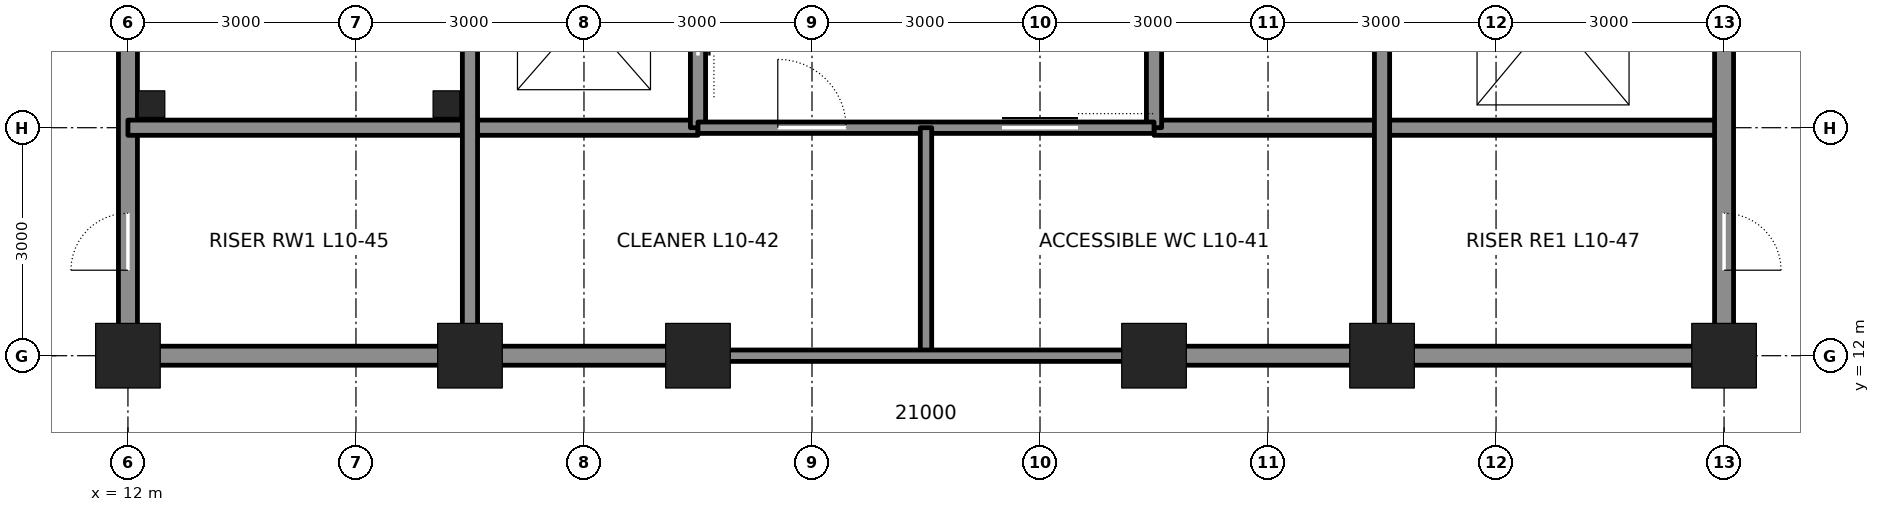
"""IFC4 building model, lengths in metres.
Left out: names, types, materials, properties, quantities, classifications, styles, units other than length and angle.
Written with IfcOpenShell. Run it as: python <this file> out.ifc"""

import sys

from ifc_helpers import new_model, si_unit, direction, frame, frame_2d, origin, origin_2d, place, context, subcontext, project, spatial, rectangle, hollow_rectangle, extrude, element, fill, save


model = new_model("IFC4")
c1 = context("Model", 3, precision=1e-05, world=origin(), true_north=direction((0.0, 1.0)))
c2 = subcontext(c1, "Body", "Model", "MODEL_VIEW")
j1 = project(units=[si_unit("LENGTHUNIT", "METRE"), si_unit("PLANEANGLEUNIT", "RADIAN")], contexts=[c1])
p1 = place(None, origin())
s1 = spatial("IfcSite", under=j1, at=p1, CompositionType="ELEMENT")
p2 = place(p1, origin())
s2 = spatial("IfcBuilding", under=s1, at=p2, CompositionType="ELEMENT")
p3 = place(p2, frame((0.0, 0.0, 51.3)))
s3 = spatial("IfcBuildingStorey", under=s2, at=p3, CompositionType="ELEMENT", Elevation=51.3)
for number, where, z_axis, x_axis in (
    (1, (12.0, 12.0, 0.0), (0.0, 0.0, 1.0), (1.0, 0.0, 0.0)),
    (2, (16.5, 12.0, 0.0), (0.0, 0.0, 1.0), (1.0, 0.0, 0.0)),
    (3, (19.5, 12.0, 0.0), (0.0, 0.0, 1.0), (1.0, 0.0, 0.0)),
    (4, (25.5, 12.0, 0.0), (0.0, 0.0, 1.0), (1.0, 0.0, 0.0)),
    (5, (28.5, 12.0, 0.0), (0.0, 0.0, 1.0), (1.0, 0.0, 0.0)),
    (6, (33.0, 12.0, 0.0), (0.0, 0.0, 1.0), (1.0, 0.0, 0.0)),
):
    element("IfcColumn", number, at=place(p3, frame(where, z_axis=z_axis, x_axis=x_axis)), inside=s3, PredefinedType="COLUMN", context=c2, shape_type="SweptSolid", body=[
        extrude(hollow_rectangle(XDim=0.85, YDim=0.85, WallThickness=0.085, at=origin_2d()), origin(), (0.0, 0.0, 1.0), 4.5),
    ])
p4 = place(p3, frame((12.0, 12.25, 0.0), z_axis=(0.0, 0.0, 1.0), x_axis=(0.0, 1.0, 0.0)))
e7 = element("IfcWall", 7, at=p4, inside=s3, PredefinedType="SOLIDWALL", context=c2, shape_type="SweptSolid", body=[
    extrude(rectangle(XDim=8.5, YDim=0.25, at=frame_2d((4.25, 0.0))), origin(), (0.0, 0.0, 1.0), 3.113),
])
p5 = place(p4, frame((0.875, 0.0, 0.0)))
e8 = element("IfcOpeningElement", 8, at=p5, cuts=e7, PredefinedType="OPENING", context=c2, shape_type="SweptSolid", body=[
    extrude(rectangle(XDim=0.75, YDim=2.1, at=frame_2d((0.375, 1.05))), frame((0.0, 0.135, 0.0), z_axis=(0.0, -1.0, 0.0), x_axis=(1.0, 0.0, 0.0)), (0.0, 0.0, 1.0), 0.27),
])
p6 = place(p3, frame((12.25, 12.0, 0.0), z_axis=(0.0, 0.0, 1.0), x_axis=(1.0, 0.0, 0.0)))
e9 = element("IfcWall", 9, at=p6, inside=s3, PredefinedType="SOLIDWALL", context=c2, shape_type="SweptSolid", body=[
    extrude(rectangle(XDim=4.0, YDim=0.25, at=frame_2d((2.0, 0.0))), origin(), (0.0, 0.0, 1.0), 3.181),
])
for number, where, z_axis, x_axis in (
    (10, (16.75, 12.0, 0.0), (0.0, 0.0, 1.0), (1.0, 0.0, 0.0)),
    (11, (25.75, 12.0, 0.0), (0.0, 0.0, 1.0), (1.0, 0.0, 0.0)),
):
    element("IfcWall", number, at=place(p3, frame(where, z_axis=z_axis, x_axis=x_axis)), inside=s3, PredefinedType="SOLIDWALL", context=c2, shape_type="SweptSolid", body=[
        extrude(rectangle(XDim=2.5, YDim=0.25, at=frame_2d((1.25, 0.0))), origin(), (0.0, 0.0, 1.0), 3.181),
    ])
p7 = place(p3, frame((28.75, 12.0, 0.0), z_axis=(0.0, 0.0, 1.0), x_axis=(1.0, 0.0, 0.0)))
e12 = element("IfcWall", 12, at=p7, inside=s3, PredefinedType="SOLIDWALL", context=c2, shape_type="SweptSolid", body=[
    extrude(rectangle(XDim=4.0, YDim=0.25, at=frame_2d((2.0, 0.0))), origin(), (0.0, 0.0, 1.0), 3.181),
])
for number, where, z_axis, x_axis in (
    (13, (12.0, 15.0, 0.0), (0.0, 0.0, 1.0), (1.0, 0.0, 0.0)),
    (14, (25.5, 15.0, 0.0), (0.0, 0.0, 1.0), (1.0, 0.0, 0.0)),
):
    element("IfcWall", number, at=place(p3, frame(where, z_axis=z_axis, x_axis=x_axis)), inside=s3, PredefinedType="SOLIDWALL", context=c2, shape_type="SweptSolid", body=[
        extrude(rectangle(XDim=7.5, YDim=0.2, at=frame_2d((3.75, 0.0))), origin(), (0.0, 0.0, 1.0), 4.34),
    ])
p8 = place(p3, frame((16.5, 12.25, 0.0), z_axis=(0.0, 0.0, 1.0), x_axis=(0.0, 1.0, 0.0)))
e15 = element("IfcWall", 15, at=p8, inside=s3, PredefinedType="SOLIDWALL", context=c2, shape_type="SweptSolid", body=[
    extrude(rectangle(XDim=8.5, YDim=0.2, at=frame_2d((4.25, 0.0))), origin(), (0.0, 0.0, 1.0), 3.413),
])
p9 = place(p3, frame((19.5, 15.0, 0.0), z_axis=(0.0, 0.0, 1.0), x_axis=(0.0, 1.0, 0.0)))
e16 = element("IfcWall", 16, at=p9, inside=s3, PredefinedType="SOLIDWALL", context=c2, shape_type="SweptSolid", body=[
    extrude(rectangle(XDim=12.0, YDim=0.2, at=frame_2d((6.0, 0.0))), origin(), (0.0, 0.0, 1.0), 3.365),
])
p10 = place(p9, frame((0.95, 0.0, 0.0)))
e17 = element("IfcOpeningElement", 17, at=p10, cuts=e16, PredefinedType="OPENING", context=c2, shape_type="SweptSolid", body=[
    extrude(rectangle(XDim=1.1, YDim=2.1, at=frame_2d((0.55, 1.05))), frame((0.0, 0.11, 0.0), z_axis=(0.0, -1.0, 0.0), x_axis=(1.0, 0.0, 0.0)), (0.0, 0.0, 1.0), 0.22),
])
p11 = place(p9, frame((3.95, 0.0, 0.0)))
e18 = element("IfcOpeningElement", 18, at=p11, cuts=e16, PredefinedType="OPENING", context=c2, shape_type="SweptSolid", body=[
    extrude(rectangle(XDim=1.1, YDim=2.1, at=frame_2d((0.55, 1.05))), frame((0.0, 0.11, 0.0), z_axis=(0.0, -1.0, 0.0), x_axis=(1.0, 0.0, 0.0)), (0.0, 0.0, 1.0), 0.22),
])
p12 = place(p9, frame((6.95, 0.0, 0.0)))
e19 = element("IfcOpeningElement", 19, at=p12, cuts=e16, PredefinedType="OPENING", context=c2, shape_type="SweptSolid", body=[
    extrude(rectangle(XDim=1.1, YDim=2.1, at=frame_2d((0.55, 1.05))), frame((0.0, 0.11, 0.0), z_axis=(0.0, -1.0, 0.0), x_axis=(1.0, 0.0, 0.0)), (0.0, 0.0, 1.0), 0.22),
])
p13 = place(p9, frame((9.95, 0.0, 0.0)))
e20 = element("IfcOpeningElement", 20, at=p13, cuts=e16, PredefinedType="OPENING", context=c2, shape_type="SweptSolid", body=[
    extrude(rectangle(XDim=1.1, YDim=2.1, at=frame_2d((0.55, 1.05))), frame((0.0, 0.11, 0.0), z_axis=(0.0, -1.0, 0.0), x_axis=(1.0, 0.0, 0.0)), (0.0, 0.0, 1.0), 0.22),
])
p14 = place(p3, frame((25.5, 15.0, 0.0), z_axis=(0.0, 0.0, 1.0), x_axis=(0.0, 1.0, 0.0)))
e21 = element("IfcWall", 21, at=p14, inside=s3, PredefinedType="SOLIDWALL", context=c2, shape_type="SweptSolid", body=[
    extrude(rectangle(XDim=12.0, YDim=0.2, at=frame_2d((6.0, 0.0))), origin(), (0.0, 0.0, 1.0), 3.365),
])
p15 = place(p3, frame((28.5, 12.25, 0.0), z_axis=(0.0, 0.0, 1.0), x_axis=(0.0, 1.0, 0.0)))
e22 = element("IfcWall", 22, at=p15, inside=s3, PredefinedType="SOLIDWALL", context=c2, shape_type="SweptSolid", body=[
    extrude(rectangle(XDim=8.5, YDim=0.2, at=frame_2d((4.25, 0.0))), origin(), (0.0, 0.0, 1.0), 3.413),
])
p16 = place(p3, frame((33.0, 12.25, 0.0), z_axis=(0.0, 0.0, 1.0), x_axis=(0.0, 1.0, 0.0)))
e23 = element("IfcWall", 23, at=p16, inside=s3, PredefinedType="SOLIDWALL", context=c2, shape_type="SweptSolid", body=[
    extrude(rectangle(XDim=8.5, YDim=0.25, at=frame_2d((4.25, 0.0))), origin(), (0.0, 0.0, 1.0), 3.113),
])
p17 = place(p16, frame((6.65, 0.0, 0.0)))
e24 = element("IfcOpeningElement", 24, at=p17, cuts=e23, PredefinedType="OPENING", context=c2, shape_type="SweptSolid", body=[
    extrude(rectangle(XDim=1.2, YDim=2.1, at=frame_2d((0.6, 1.05))), frame((0.0, 0.135, 0.0), z_axis=(0.0, -1.0, 0.0), x_axis=(1.0, 0.0, 0.0)), (0.0, 0.0, 1.0), 0.27),
])
p18 = place(p16, frame((0.875, 0.0, 0.0)))
e25 = element("IfcOpeningElement", 25, at=p18, cuts=e23, PredefinedType="OPENING", context=c2, shape_type="SweptSolid", body=[
    extrude(rectangle(XDim=0.75, YDim=2.1, at=frame_2d((0.375, 1.05))), frame((0.0, 0.135, 0.0), z_axis=(0.0, -1.0, 0.0), x_axis=(1.0, 0.0, 0.0)), (0.0, 0.0, 1.0), 0.27),
])
p19 = place(p3, frame((19.5, 15.0, 0.0), z_axis=(0.0, 0.0, 1.0), x_axis=(1.0, 0.0, 0.0)))
e26 = element("IfcWall", 26, at=p19, inside=s3, PredefinedType="PARTITIONING", context=c2, shape_type="SweptSolid", body=[
    extrude(rectangle(XDim=6.0, YDim=0.15, at=frame_2d((3.0, 0.0))), origin(), (0.0, 0.0, 1.0), 4.34),
])
p20 = place(p19, frame((4.0, 0.0, 0.0)))
e27 = element("IfcOpeningElement", 27, at=p20, cuts=e26, PredefinedType="OPENING", context=c2, shape_type="SweptSolid", body=[
    extrude(rectangle(XDim=1.0, YDim=2.1, at=frame_2d((0.5, 1.05))), frame((0.0, 0.085, 0.0), z_axis=(0.0, -1.0, 0.0), x_axis=(1.0, 0.0, 0.0)), (0.0, 0.0, 1.0), 0.17),
])
p21 = place(p19, frame((1.05, 0.0, 0.0)))
e28 = element("IfcOpeningElement", 28, at=p21, cuts=e26, PredefinedType="OPENING", context=c2, shape_type="SweptSolid", body=[
    extrude(rectangle(XDim=0.9, YDim=2.1, at=frame_2d((0.45, 1.05))), frame((0.0, 0.085, 0.0), z_axis=(0.0, -1.0, 0.0), x_axis=(1.0, 0.0, 0.0)), (0.0, 0.0, 1.0), 0.17),
])
p22 = place(p3, frame((22.5, 15.0, 0.0), z_axis=(0.0, 0.0, 1.0), x_axis=(0.0, -1.0, 0.0)))
e29 = element("IfcWall", 29, at=p22, inside=s3, PredefinedType="PARTITIONING", context=c2, shape_type="SweptSolid", body=[
    extrude(rectangle(XDim=3.0, YDim=0.15, at=frame_2d((1.5, 0.0))), origin(), (0.0, 0.0, 1.0), 4.34),
])
p23 = place(p3, frame((19.5, 12.0, 0.0), z_axis=(0.0, 0.0, 1.0), x_axis=(1.0, 0.0, 0.0)))
e30 = element("IfcWall", 30, at=p23, inside=s3, PredefinedType="PARTITIONING", context=c2, shape_type="SweptSolid", body=[
    extrude(rectangle(XDim=6.0, YDim=0.15, at=frame_2d((3.0, 0.0))), origin(), (0.0, 0.0, 1.0), 3.181),
])
for number, where, z_axis, x_axis in (
    (31, (12.31, 15.31, 0.0), (0.0, 0.0, 1.0), (1.0, 0.0, 0.0)),
    (32, (16.19, 15.31, 0.0), (0.0, 0.0, 1.0), (1.0, 0.0, 0.0)),
):
    element("IfcColumn", number, at=place(p3, frame(where, z_axis=z_axis, x_axis=x_axis)), inside=s3, PredefinedType="COLUMN", context=c2, shape_type="SweptSolid", body=[
        extrude(hollow_rectangle(XDim=0.35, YDim=0.35, WallThickness=0.035, at=origin_2d()), origin(), (0.0, 0.0, 1.0), 4.5),
    ])
p24 = place(p5, origin())
e33 = element("IfcDoor", 33, at=p24, inside=s3, OperationType="SINGLE_SWING_LEFT", PredefinedType="DOOR", context=c2, shape_type="SweptSolid", body=[
    extrude(rectangle(XDim=0.75, YDim=2.1, at=frame_2d((0.375, 1.05))), frame((0.0, 0.025, 0.0), z_axis=(0.0, -1.0, 0.0), x_axis=(1.0, 0.0, 0.0)), (0.0, 0.0, 1.0), 0.05),
])
fill(e8, e33)
p25 = place(p18, frame((0.75, 0.0, 0.0), z_axis=(0.0, 0.0, 1.0), x_axis=(-1.0, 0.0, 0.0)))
e34 = element("IfcDoor", 34, at=p25, inside=s3, OperationType="SINGLE_SWING_RIGHT", PredefinedType="DOOR", context=c2, shape_type="SweptSolid", body=[
    extrude(rectangle(XDim=0.75, YDim=2.1, at=frame_2d((0.375, 1.05))), frame((0.0, 0.025, 0.0), z_axis=(0.0, -1.0, 0.0), x_axis=(1.0, 0.0, 0.0)), (0.0, 0.0, 1.0), 0.05),
])
fill(e25, e34)
p26 = place(p20, origin())
e35 = element("IfcDoor", 35, at=p26, inside=s3, OperationType="SLIDING_TO_LEFT", PredefinedType="DOOR", context=c2, shape_type="SweptSolid", body=[
    extrude(rectangle(XDim=1.0, YDim=2.1, at=frame_2d((0.5, 1.05))), frame((0.0, 0.025, 0.0), z_axis=(0.0, -1.0, 0.0), x_axis=(1.0, 0.0, 0.0)), (0.0, 0.0, 1.0), 0.05),
])
fill(e27, e35)
p27 = place(p21, origin())
e36 = element("IfcDoor", 36, at=p27, inside=s3, OperationType="SINGLE_SWING_LEFT", PredefinedType="DOOR", context=c2, shape_type="SweptSolid", body=[
    extrude(rectangle(XDim=0.9, YDim=2.1, at=frame_2d((0.45, 1.05))), frame((0.0, 0.025, 0.0), z_axis=(0.0, -1.0, 0.0), x_axis=(1.0, 0.0, 0.0)), (0.0, 0.0, 1.0), 0.05),
])
fill(e28, e36)
p28 = place(p10, origin())
e37 = element("IfcDoor", 37, at=p28, inside=s3, OperationType="DOUBLE_DOOR_SLIDING", PredefinedType="DOOR", context=c2, shape_type="SweptSolid", body=[
    extrude(rectangle(XDim=1.1, YDim=2.1, at=frame_2d((0.55, 1.05))), frame((0.0, 0.025, 0.0), z_axis=(0.0, -1.0, 0.0), x_axis=(1.0, 0.0, 0.0)), (0.0, 0.0, 1.0), 0.05),
])
fill(e17, e37)
save(model, sys.argv[1])
